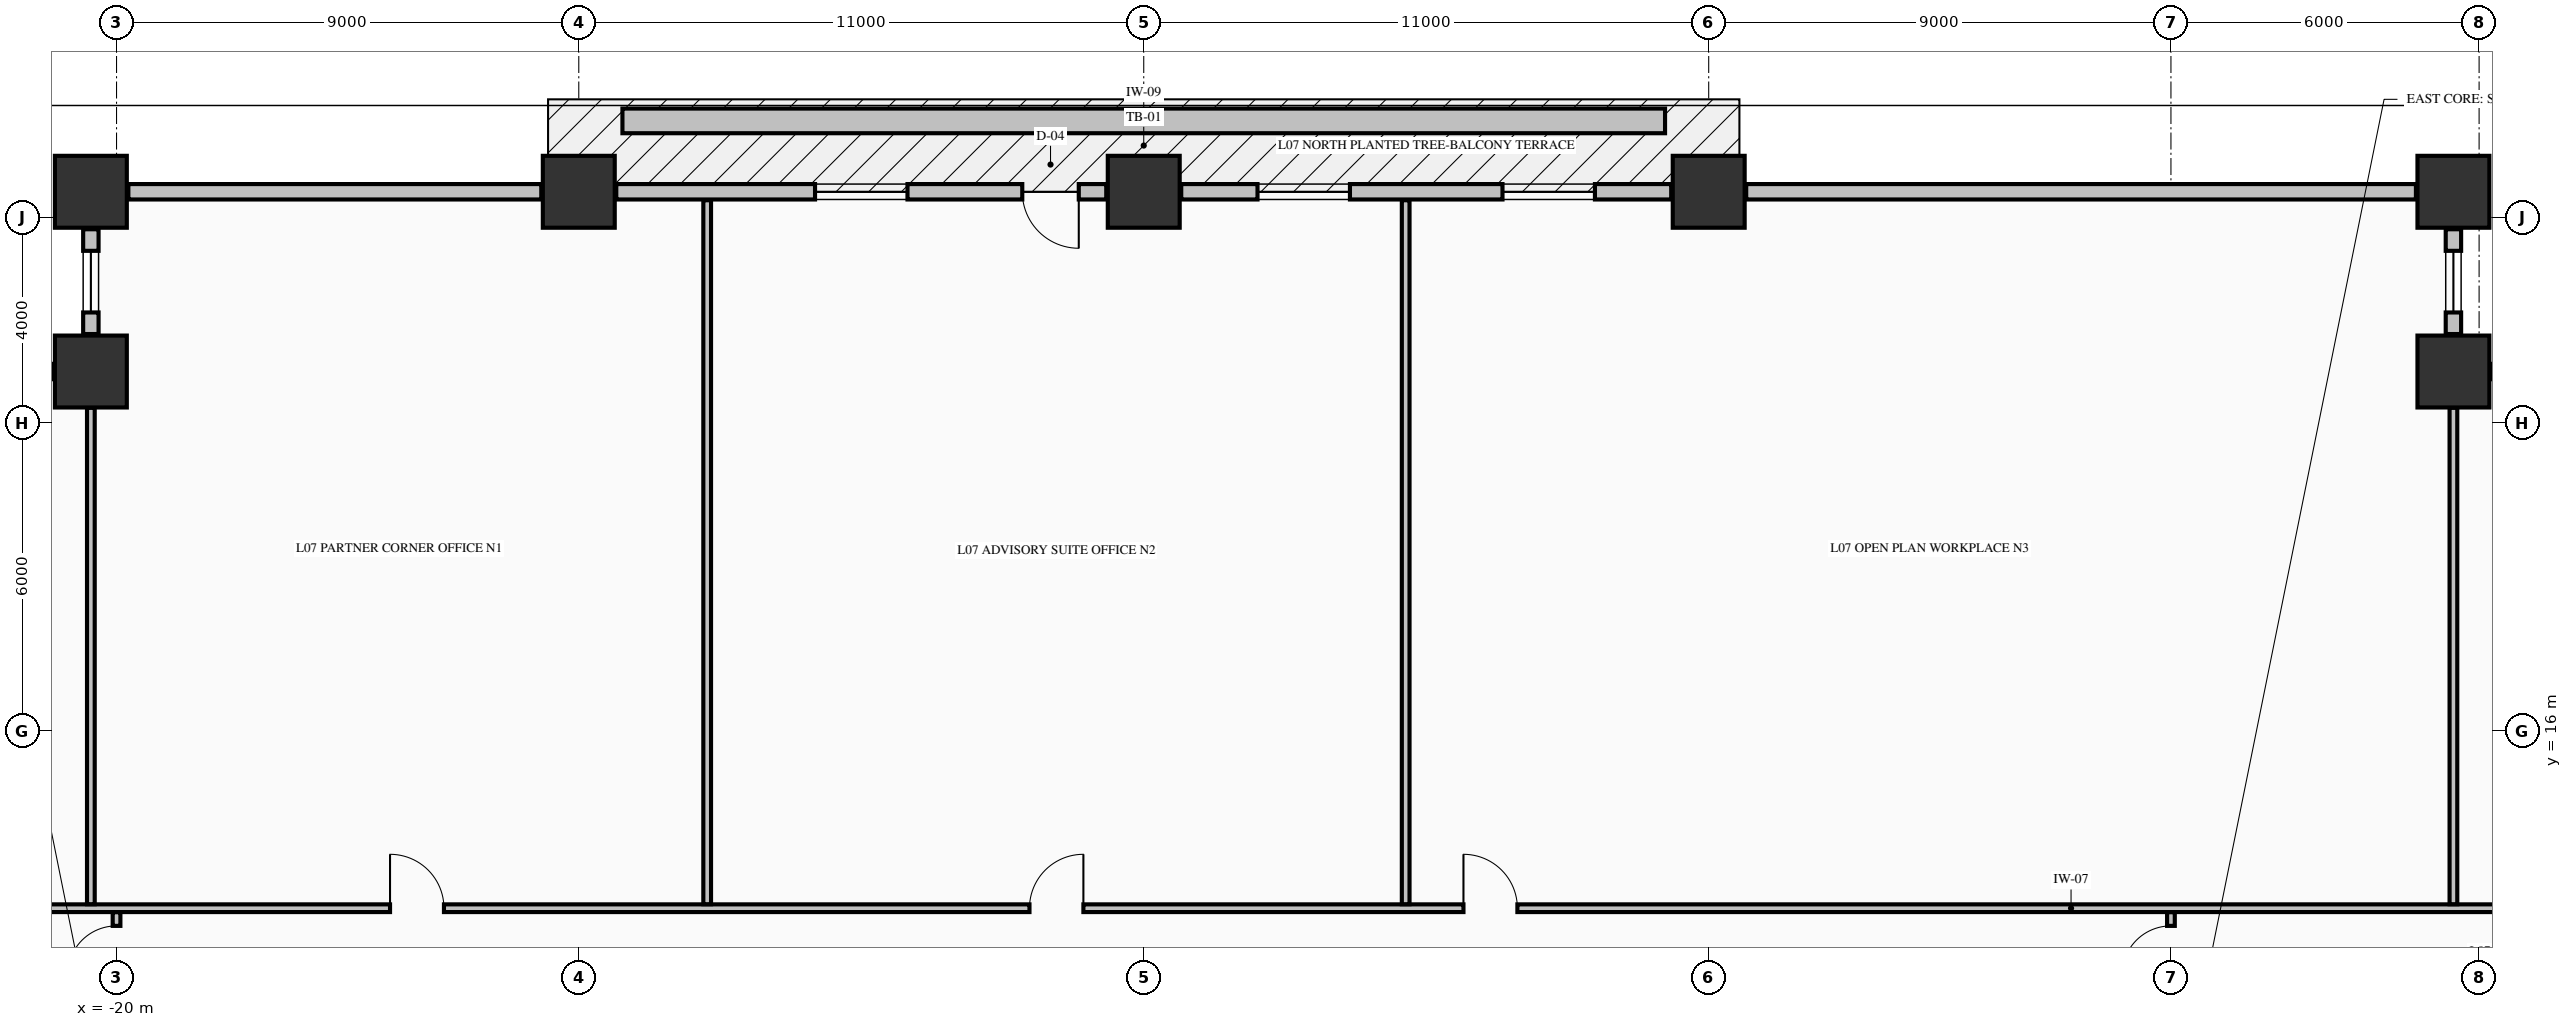
"""IFC4 building model, lengths in metres.
Left out: names, types, materials, properties, quantities, classifications, styles, units other than length and angle.
Written with IfcOpenShell. Run it as: python <this file> out.ifc"""

import sys

from ifc_helpers import new_model, si_unit, direction, frame, frame_2d, origin, origin_2d, place, context, subcontext, project, spatial, rectangle, extrude, element, fill, save


model = new_model("IFC4")
c1 = context("Model", 3, precision=1e-05, world=origin(), true_north=direction((0.0, 1.0)))
c2 = subcontext(c1, "Body", "Model", "MODEL_VIEW")
j1 = project(units=[si_unit("LENGTHUNIT", "METRE"), si_unit("PLANEANGLEUNIT", "RADIAN")], contexts=[c1])
p1 = place(None, origin())
s1 = spatial("IfcSite", under=j1, at=p1, CompositionType="ELEMENT")
p2 = place(p1, origin())
s2 = spatial("IfcBuilding", under=s1, at=p2, CompositionType="ELEMENT")
p3 = place(p2, frame((0.0, 0.0, 34.34)))
s3 = spatial("IfcBuildingStorey", under=s2, at=p3, CompositionType="ELEMENT", Elevation=34.34)
for number, where, z_axis, x_axis in (
    (1, (-20.5, 26.5, -0.3), (0.0, 0.0, 1.0), (1.0, 0.0, 0.0)),
    (2, (-11.0, 26.5, -0.3), (0.0, 0.0, 1.0), (1.0, 0.0, 0.0)),
    (3, (0.0, 26.5, -0.3), (0.0, 0.0, 1.0), (1.0, 0.0, 0.0)),
    (4, (11.0, 26.5, -0.3), (0.0, 0.0, 1.0), (1.0, 0.0, 0.0)),
    (5, (25.5, 26.5, -0.3), (0.0, 0.0, 1.0), (1.0, 0.0, 0.0)),
    (6, (25.5, 23.0, -0.3), (0.0, 0.0, 1.0), (1.0, 0.0, 0.0)),
    (7, (-20.5, 23.0, -0.3), (0.0, 0.0, 1.0), (1.0, 0.0, 0.0)),
):
    element("IfcColumn", number, at=place(p3, frame(where, z_axis=z_axis, x_axis=x_axis)), inside=s3, PredefinedType="COLUMN", context=c2, shape_type="SweptSolid", body=[
        extrude(rectangle(XDim=1.4, YDim=1.4, at=origin_2d()), origin(), (0.0, 0.0, 1.0), 3.62),
    ])
p4 = place(p3, frame((28.27, 23.0, 0.0), z_axis=(0.0, 0.0, 1.0), x_axis=(-1.0, 0.0, 0.0)))
e8 = element("IfcWall", 8, at=p4, inside=s3, PredefinedType="STANDARD", context=c2, shape_type="SweptSolid", body=[
    extrude(rectangle(XDim=2.04, YDim=0.3, at=frame_2d((1.02, 0.0))), origin(), (0.0, 0.0, 1.0), 2.712),
])
p5 = place(p4, frame((0.42, 0.0, 0.82)))
e9 = element("IfcOpeningElement", 9, at=p5, cuts=e8, PredefinedType="OPENING", context=c2, shape_type="SweptSolid", body=[
    extrude(rectangle(XDim=1.2, YDim=1.65, at=frame_2d((0.6, 0.825))), frame((0.0, 0.16, 0.0), z_axis=(0.0, -1.0, 0.0), x_axis=(1.0, 0.0, 0.0)), (0.0, 0.0, 1.0), 0.32),
])
p6 = place(p3, frame((25.5, 23.73, 0.0), z_axis=(0.0, 0.0, 1.0), x_axis=(0.0, 1.0, 0.0)))
e10 = element("IfcWall", 10, at=p6, inside=s3, PredefinedType="STANDARD", context=c2, shape_type="SweptSolid", body=[
    extrude(rectangle(XDim=2.04, YDim=0.3, at=frame_2d((1.02, 0.0))), origin(), (0.0, 0.0, 1.0), 2.712),
])
p7 = place(p6, frame((0.42, 0.0, 0.82)))
e11 = element("IfcOpeningElement", 11, at=p7, cuts=e10, PredefinedType="OPENING", context=c2, shape_type="SweptSolid", body=[
    extrude(rectangle(XDim=1.2, YDim=1.65, at=frame_2d((0.6, 0.825))), frame((0.0, 0.16, 0.0), z_axis=(0.0, -1.0, 0.0), x_axis=(1.0, 0.0, 0.0)), (0.0, 0.0, 1.0), 0.32),
])
p8 = place(p3, frame((-20.5, 25.77, 0.0), z_axis=(0.0, 0.0, 1.0), x_axis=(0.0, -1.0, 0.0)))
e12 = element("IfcWall", 12, at=p8, inside=s3, PredefinedType="STANDARD", context=c2, shape_type="SweptSolid", body=[
    extrude(rectangle(XDim=2.04, YDim=0.3, at=frame_2d((1.02, 0.0))), origin(), (0.0, 0.0, 1.0), 2.712),
])
p9 = place(p8, frame((0.42, 0.0, 0.82)))
e13 = element("IfcOpeningElement", 13, at=p9, cuts=e12, PredefinedType="OPENING", context=c2, shape_type="SweptSolid", body=[
    extrude(rectangle(XDim=1.2, YDim=1.65, at=frame_2d((0.6, 0.825))), frame((0.0, 0.16, 0.0), z_axis=(0.0, -1.0, 0.0), x_axis=(1.0, 0.0, 0.0)), (0.0, 0.0, 1.0), 0.32),
])
p10 = place(p3, frame((-21.23, 23.0, 0.0), z_axis=(0.0, 0.0, 1.0), x_axis=(-1.0, 0.0, 0.0)))
e14 = element("IfcWall", 14, at=p10, inside=s3, PredefinedType="STANDARD", context=c2, shape_type="SweptSolid", body=[
    extrude(rectangle(XDim=2.04, YDim=0.3, at=frame_2d((1.02, 0.0))), origin(), (0.0, 0.0, 1.0), 2.712),
])
p11 = place(p10, frame((0.42, 0.0, 0.82)))
e15 = element("IfcOpeningElement", 15, at=p11, cuts=e14, PredefinedType="OPENING", context=c2, shape_type="SweptSolid", body=[
    extrude(rectangle(XDim=1.2, YDim=1.65, at=frame_2d((0.6, 0.825))), frame((0.0, 0.16, 0.0), z_axis=(0.0, -1.0, 0.0), x_axis=(1.0, 0.0, 0.0)), (0.0, 0.0, 1.0), 0.32),
])
p12 = place(p3, frame((-11.73, 26.5, 0.0), z_axis=(0.0, 0.0, 1.0), x_axis=(-1.0, 0.0, 0.0)))
e16 = element("IfcWall", 16, at=p12, inside=s3, PredefinedType="STANDARD", context=c2, shape_type="SweptSolid", body=[
    extrude(rectangle(XDim=8.04, YDim=0.3, at=frame_2d((4.02, 0.0))), origin(), (0.0, 0.0, 1.0), 2.712),
])
p13 = place(p3, frame((-0.73, 26.5, 0.0), z_axis=(0.0, 0.0, 1.0), x_axis=(-1.0, 0.0, 0.0)))
e17 = element("IfcWall", 17, at=p13, inside=s3, PredefinedType="STANDARD", context=c2, shape_type="SweptSolid", body=[
    extrude(rectangle(XDim=9.54, YDim=0.3, at=frame_2d((4.77, 0.0))), origin(), (0.0, 0.0, 1.0), 2.712),
])
p14 = place(p13, frame((0.535, 0.0, 0.0)))
e18 = element("IfcOpeningElement", 18, at=p14, cuts=e17, PredefinedType="OPENING", context=c2, shape_type="SweptSolid", body=[
    extrude(rectangle(XDim=1.1, YDim=2.15, at=frame_2d((0.55, 1.075))), frame((0.0, 0.16, 0.0), z_axis=(0.0, -1.0, 0.0), x_axis=(1.0, 0.0, 0.0)), (0.0, 0.0, 1.0), 0.32),
])
p15 = place(p13, frame((3.87, 0.0, 0.78)))
e19 = element("IfcOpeningElement", 19, at=p15, cuts=e17, PredefinedType="OPENING", context=c2, shape_type="SweptSolid", body=[
    extrude(rectangle(XDim=1.8, YDim=1.72, at=frame_2d((0.9, 0.86))), frame((0.0, 0.16, 0.0), z_axis=(0.0, -1.0, 0.0), x_axis=(1.0, 0.0, 0.0)), (0.0, 0.0, 1.0), 0.32),
])
p16 = place(p3, frame((10.27, 26.5, 0.0), z_axis=(0.0, 0.0, 1.0), x_axis=(-1.0, 0.0, 0.0)))
e20 = element("IfcWall", 20, at=p16, inside=s3, PredefinedType="STANDARD", context=c2, shape_type="SweptSolid", body=[
    extrude(rectangle(XDim=9.54, YDim=0.3, at=frame_2d((4.77, 0.0))), origin(), (0.0, 0.0, 1.0), 2.712),
])
p17 = place(p16, frame((1.485, 0.0, 0.78)))
e21 = element("IfcOpeningElement", 21, at=p17, cuts=e20, PredefinedType="OPENING", context=c2, shape_type="SweptSolid", body=[
    extrude(rectangle(XDim=1.8, YDim=1.72, at=frame_2d((0.9, 0.86))), frame((0.0, 0.16, 0.0), z_axis=(0.0, -1.0, 0.0), x_axis=(1.0, 0.0, 0.0)), (0.0, 0.0, 1.0), 0.32),
])
p18 = place(p16, frame((6.255, 0.0, 0.78)))
e22 = element("IfcOpeningElement", 22, at=p18, cuts=e20, PredefinedType="OPENING", context=c2, shape_type="SweptSolid", body=[
    extrude(rectangle(XDim=1.8, YDim=1.72, at=frame_2d((0.9, 0.86))), frame((0.0, 0.16, 0.0), z_axis=(0.0, -1.0, 0.0), x_axis=(1.0, 0.0, 0.0)), (0.0, 0.0, 1.0), 0.32),
])
p19 = place(p3, frame((24.77, 26.5, 0.0), z_axis=(0.0, 0.0, 1.0), x_axis=(-1.0, 0.0, 0.0)))
e23 = element("IfcWall", 23, at=p19, inside=s3, PredefinedType="STANDARD", context=c2, shape_type="SweptSolid", body=[
    extrude(rectangle(XDim=13.04, YDim=0.3, at=frame_2d((6.52, 0.0))), origin(), (0.0, 0.0, 1.0), 2.712),
])
p20 = place(p3, frame((-23.835, 12.55, 0.0), z_axis=(0.0, 0.0, 1.0), x_axis=(1.0, 0.0, 0.0)))
e24 = element("IfcWall", 24, at=p20, inside=s3, PredefinedType="PARTITIONING", context=c2, shape_type="SweptSolid", body=[
    extrude(rectangle(XDim=52.67, YDim=0.15, at=frame_2d((26.335, 0.0))), origin(), (0.0, 0.0, 1.0), 3.32),
])
p21 = place(p20, frame((9.16, 0.0, 0.0)))
e25 = element("IfcOpeningElement", 25, at=p21, cuts=e24, PredefinedType="OPENING", context=c2, shape_type="SweptSolid", body=[
    extrude(rectangle(XDim=1.05, YDim=2.15, at=frame_2d((0.525, 1.075))), frame((0.0, 0.085, 0.0), z_axis=(0.0, -1.0, 0.0), x_axis=(1.0, 0.0, 0.0)), (0.0, 0.0, 1.0), 0.17),
])
p22 = place(p20, frame((21.61, 0.0, 0.0)))
e26 = element("IfcOpeningElement", 26, at=p22, cuts=e24, PredefinedType="OPENING", context=c2, shape_type="SweptSolid", body=[
    extrude(rectangle(XDim=1.05, YDim=2.15, at=frame_2d((0.525, 1.075))), frame((0.0, 0.085, 0.0), z_axis=(0.0, -1.0, 0.0), x_axis=(1.0, 0.0, 0.0)), (0.0, 0.0, 1.0), 0.17),
])
p23 = place(p20, frame((30.06, 0.0, 0.0)))
e27 = element("IfcOpeningElement", 27, at=p23, cuts=e24, PredefinedType="OPENING", context=c2, shape_type="SweptSolid", body=[
    extrude(rectangle(XDim=1.05, YDim=2.15, at=frame_2d((0.525, 1.075))), frame((0.0, 0.085, 0.0), z_axis=(0.0, -1.0, 0.0), x_axis=(1.0, 0.0, 0.0)), (0.0, 0.0, 1.0), 0.17),
])
p24 = place(p3, frame((-20.5, 12.628, 0.0), z_axis=(0.0, 0.0, 1.0), x_axis=(0.0, 1.0, 0.0)))
e28 = element("IfcWall", 28, at=p24, inside=s3, PredefinedType="PARTITIONING", context=c2, shape_type="SweptSolid", body=[
    extrude(rectangle(XDim=9.666, YDim=0.15, at=frame_2d((4.833, 0.0))), origin(), (0.0, 0.0, 1.0), 3.32),
])
p25 = place(p3, frame((-20.0, 11.106, 0.0), z_axis=(0.0, 0.0, 1.0), x_axis=(0.0, 1.0, 0.0)))
e29 = element("IfcWall", 29, at=p25, inside=s3, PredefinedType="PARTITIONING", context=c2, shape_type="SweptSolid", body=[
    extrude(rectangle(XDim=1.366, YDim=0.15, at=frame_2d((0.683, 0.0))), origin(), (0.0, 0.0, 1.0), 3.32),
])
p26 = place(p25, frame((0.15, 0.0, 0.0)))
e30 = element("IfcOpeningElement", 30, at=p26, cuts=e29, PredefinedType="OPENING", context=c2, shape_type="SweptSolid", body=[
    extrude(rectangle(XDim=0.95, YDim=2.15, at=frame_2d((0.475, 1.075))), frame((0.0, 0.085, 0.0), z_axis=(0.0, -1.0, 0.0), x_axis=(1.0, 0.0, 0.0)), (0.0, 0.0, 1.0), 0.17),
])
for number, where, z_axis, x_axis in (
    (31, (-8.5, 12.628, 0.0), (0.0, 0.0, 1.0), (0.0, 1.0, 0.0)),
    (32, (5.1, 12.628, 0.0), (0.0, 0.0, 1.0), (0.0, 1.0, 0.0)),
):
    element("IfcWall", number, at=place(p3, frame(where, z_axis=z_axis, x_axis=x_axis)), inside=s3, PredefinedType="PARTITIONING", context=c2, shape_type="SweptSolid", body=[
        extrude(rectangle(XDim=13.707, YDim=0.15, at=frame_2d((6.854, 0.0))), origin(), (0.0, 0.0, 1.0), 3.32),
    ])
p27 = place(p3, frame((20.0, 11.106, 0.0), z_axis=(0.0, 0.0, 1.0), x_axis=(0.0, 1.0, 0.0)))
e33 = element("IfcWall", 33, at=p27, inside=s3, PredefinedType="PARTITIONING", context=c2, shape_type="SweptSolid", body=[
    extrude(rectangle(XDim=1.366, YDim=0.15, at=frame_2d((0.683, 0.0))), origin(), (0.0, 0.0, 1.0), 2.66),
])
p28 = place(p27, frame((0.15, 0.0, 0.0)))
e34 = element("IfcOpeningElement", 34, at=p28, cuts=e33, PredefinedType="OPENING", context=c2, shape_type="SweptSolid", body=[
    extrude(rectangle(XDim=0.95, YDim=2.15, at=frame_2d((0.475, 1.075))), frame((0.0, 0.085, 0.0), z_axis=(0.0, -1.0, 0.0), x_axis=(1.0, 0.0, 0.0)), (0.0, 0.0, 1.0), 0.17),
])
p29 = place(p3, frame((25.5, 12.628, 0.0), z_axis=(0.0, 0.0, 1.0), x_axis=(0.0, 1.0, 0.0)))
e35 = element("IfcWall", 35, at=p29, inside=s3, PredefinedType="PARTITIONING", context=c2, shape_type="SweptSolid", body=[
    extrude(rectangle(XDim=9.666, YDim=0.15, at=frame_2d((4.833, 0.0))), origin(), (0.0, 0.0, 1.0), 3.32),
])
p30 = place(p3, frame((-10.15, 27.88, -0.04), z_axis=(0.0, 0.0, 1.0), x_axis=(1.0, 0.0, 0.0)))
e36 = element("IfcWall", 36, at=p30, inside=s3, PredefinedType="PARAPET", context=c2, shape_type="SweptSolid", body=[
    extrude(rectangle(XDim=20.3, YDim=0.48, at=frame_2d((10.15, 0.0))), origin(), (0.0, 0.0, 1.0), 0.52),
])
p31 = place(p7, origin())
e37 = element("IfcWindow", 37, at=p31, inside=s3, PartitioningType="SINGLE_PANEL", PredefinedType="WINDOW", context=c2, shape_type="SweptSolid", body=[
    extrude(rectangle(XDim=1.2, YDim=1.65, at=frame_2d((0.6, 0.825))), frame((0.0, 0.03, 0.0), z_axis=(0.0, -1.0, 0.0), x_axis=(1.0, 0.0, 0.0)), (0.0, 0.0, 1.0), 0.06),
])
fill(e11, e37)
p32 = place(p9, origin())
e38 = element("IfcWindow", 38, at=p32, inside=s3, PartitioningType="SINGLE_PANEL", PredefinedType="WINDOW", context=c2, shape_type="SweptSolid", body=[
    extrude(rectangle(XDim=1.2, YDim=1.65, at=frame_2d((0.6, 0.825))), frame((0.0, 0.03, 0.0), z_axis=(0.0, -1.0, 0.0), x_axis=(1.0, 0.0, 0.0)), (0.0, 0.0, 1.0), 0.06),
])
fill(e13, e38)
p33 = place(p14, origin())
e39 = element("IfcDoor", 39, at=p33, inside=s3, OperationType="SINGLE_SWING_LEFT", PredefinedType="DOOR", context=c2, shape_type="SweptSolid", body=[
    extrude(rectangle(XDim=1.1, YDim=2.15, at=frame_2d((0.55, 1.075))), frame((0.0, 0.025, 0.0), z_axis=(0.0, -1.0, 0.0), x_axis=(1.0, 0.0, 0.0)), (0.0, 0.0, 1.0), 0.05),
])
fill(e18, e39)
p34 = place(p15, origin())
e40 = element("IfcWindow", 40, at=p34, inside=s3, PartitioningType="SINGLE_PANEL", PredefinedType="WINDOW", context=c2, shape_type="SweptSolid", body=[
    extrude(rectangle(XDim=1.8, YDim=1.72, at=frame_2d((0.9, 0.86))), frame((0.0, 0.03, 0.0), z_axis=(0.0, -1.0, 0.0), x_axis=(1.0, 0.0, 0.0)), (0.0, 0.0, 1.0), 0.06),
])
fill(e19, e40)
p35 = place(p17, origin())
e41 = element("IfcWindow", 41, at=p35, inside=s3, PartitioningType="SINGLE_PANEL", PredefinedType="WINDOW", context=c2, shape_type="SweptSolid", body=[
    extrude(rectangle(XDim=1.8, YDim=1.72, at=frame_2d((0.9, 0.86))), frame((0.0, 0.03, 0.0), z_axis=(0.0, -1.0, 0.0), x_axis=(1.0, 0.0, 0.0)), (0.0, 0.0, 1.0), 0.06),
])
fill(e21, e41)
p36 = place(p18, origin())
e42 = element("IfcWindow", 42, at=p36, inside=s3, PartitioningType="SINGLE_PANEL", PredefinedType="WINDOW", context=c2, shape_type="SweptSolid", body=[
    extrude(rectangle(XDim=1.8, YDim=1.72, at=frame_2d((0.9, 0.86))), frame((0.0, 0.03, 0.0), z_axis=(0.0, -1.0, 0.0), x_axis=(1.0, 0.0, 0.0)), (0.0, 0.0, 1.0), 0.06),
])
fill(e22, e42)
p37 = place(p21, origin())
e43 = element("IfcDoor", 43, at=p37, inside=s3, OperationType="SINGLE_SWING_LEFT", PredefinedType="DOOR", context=c2, shape_type="SweptSolid", body=[
    extrude(rectangle(XDim=1.05, YDim=2.15, at=frame_2d((0.525, 1.075))), frame((0.0, 0.025, 0.0), z_axis=(0.0, -1.0, 0.0), x_axis=(1.0, 0.0, 0.0)), (0.0, 0.0, 1.0), 0.05),
])
fill(e25, e43)
p38 = place(p22, origin())
e44 = element("IfcDoor", 44, at=p38, inside=s3, OperationType="SINGLE_SWING_RIGHT", PredefinedType="DOOR", context=c2, shape_type="SweptSolid", body=[
    extrude(rectangle(XDim=1.05, YDim=2.15, at=frame_2d((0.525, 1.075))), frame((0.0, 0.025, 0.0), z_axis=(0.0, -1.0, 0.0), x_axis=(1.0, 0.0, 0.0)), (0.0, 0.0, 1.0), 0.05),
])
fill(e26, e44)
p39 = place(p23, origin())
e45 = element("IfcDoor", 45, at=p39, inside=s3, OperationType="SINGLE_SWING_LEFT", PredefinedType="DOOR", context=c2, shape_type="SweptSolid", body=[
    extrude(rectangle(XDim=1.05, YDim=2.15, at=frame_2d((0.525, 1.075))), frame((0.0, 0.025, 0.0), z_axis=(0.0, -1.0, 0.0), x_axis=(1.0, 0.0, 0.0)), (0.0, 0.0, 1.0), 0.05),
])
fill(e27, e45)
p40 = place(p26, origin())
e46 = element("IfcDoor", 46, at=p40, inside=s3, OperationType="SINGLE_SWING_LEFT", PredefinedType="DOOR", context=c2, shape_type="SweptSolid", body=[
    extrude(rectangle(XDim=0.95, YDim=2.15, at=frame_2d((0.475, 1.075))), frame((0.0, 0.025, 0.0), z_axis=(0.0, -1.0, 0.0), x_axis=(1.0, 0.0, 0.0)), (0.0, 0.0, 1.0), 0.05),
])
fill(e30, e46)
p41 = place(p28, origin())
e47 = element("IfcDoor", 47, at=p41, inside=s3, OperationType="SINGLE_SWING_LEFT", PredefinedType="DOOR", context=c2, shape_type="SweptSolid", body=[
    extrude(rectangle(XDim=0.95, YDim=2.15, at=frame_2d((0.475, 1.075))), frame((0.0, 0.025, 0.0), z_axis=(0.0, -1.0, 0.0), x_axis=(1.0, 0.0, 0.0)), (0.0, 0.0, 1.0), 0.05),
])
fill(e34, e47)
save(model, sys.argv[1])
